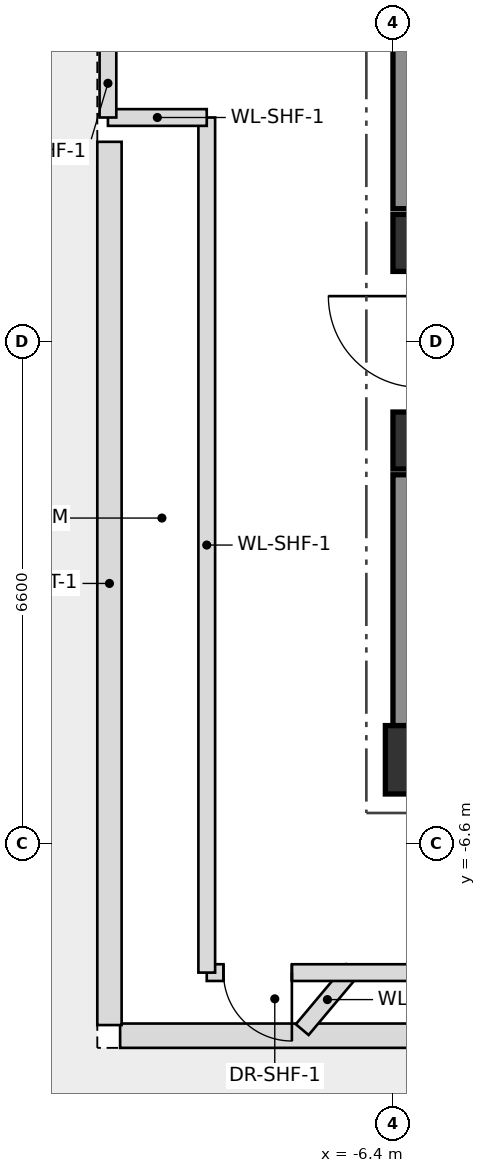
"""IFC4 building model, lengths in metres.
Left out: names, types, materials, properties, quantities, classifications, styles, units other than length and angle.
Written with IfcOpenShell. Run it as: python <this file> out.ifc"""

import sys

from ifc_helpers import new_model, si_unit, direction, frame, frame_2d, origin, origin_2d, place, context, subcontext, project, spatial, rectangle, extrude, source, transform, mapped, element, fill, save


model = new_model("IFC4")
c1 = context("Model", 3, precision=1e-05, world=origin(), true_north=direction((0.0, 1.0)))
c2 = subcontext(c1, "Body", "Model", "MODEL_VIEW")
j1 = project(units=[si_unit("LENGTHUNIT", "METRE"), si_unit("PLANEANGLEUNIT", "RADIAN")], contexts=[c1])
p1 = place(None, origin())
s1 = spatial("IfcSite", under=j1, at=p1, CompositionType="ELEMENT")
p2 = place(p1, origin())
s2 = spatial("IfcBuilding", under=s1, at=p2, CompositionType="ELEMENT")
p3 = place(p2, frame((0.0, 0.0, 49.7)))
s3 = spatial("IfcBuildingStorey", under=s2, at=p3, CompositionType="ELEMENT", Elevation=49.7)
m1 = source(origin(), c2, "Body", "SweptSolid", [
    extrude(rectangle(XDim=0.9, YDim=0.9, at=origin_2d()), origin(), (0.0, 0.0, 1.0), 5.1),
])
p4 = place(p3, frame((-6.05, -5.5, 0.0), z_axis=(0.0, 0.0, 1.0), x_axis=(1.0, 0.0, 0.0)))
e1 = element("IfcColumn", 1, at=p4, inside=s3, PredefinedType="COLUMN", context=c2, shape_type="MappedRepresentation", body=[
    mapped(m1, transform((0.0, 0.0, 0.0), scale=1.0)),
])
p5 = place(p3, frame((-6.4, -5.475, 0.0), z_axis=(0.0, 0.0, 1.0), x_axis=(1.0, 0.0, 0.0)))
e2 = element("IfcWall", 2, at=p5, inside=s3, PredefinedType="SHEAR", context=c2, shape_type="SweptSolid", body=[
    extrude(rectangle(XDim=12.8, YDim=0.75, at=frame_2d((6.4, 0.0))), origin(), (0.0, 0.0, 1.0), 5.1),
])
p6 = place(p5, frame((8.6, 0.0, 0.0)))
e3 = element("IfcOpeningElement", 3, at=p6, cuts=e2, PredefinedType="OPENING", context=c2, shape_type="SweptSolid", body=[
    extrude(rectangle(XDim=1.2, YDim=2.2, at=frame_2d((0.6, 1.1))), frame((0.0, 0.385, 0.0), z_axis=(0.0, -1.0, 0.0), x_axis=(1.0, 0.0, 0.0)), (0.0, 0.0, 1.0), 0.77),
])
for number, where, z_axis, x_axis in (
    (4, (-6.025, -5.1, 0.0), (0.0, 0.0, 1.0), (0.0, 1.0, 0.0)),
    (5, (-6.025, 1.75, 0.0), (0.0, 0.0, 1.0), (0.0, 1.0, 0.0)),
):
    element("IfcWall", number, at=place(p3, frame(where, z_axis=z_axis, x_axis=x_axis)), inside=s3, PredefinedType="SHEAR", context=c2, shape_type="SweptSolid", body=[
        extrude(rectangle(XDim=3.35, YDim=0.75, at=frame_2d((1.675, 0.0))), origin(), (0.0, 0.0, 1.0), 5.1),
    ])
m2 = source(origin(), c2, "Body", "SweptSolid", [
    extrude(rectangle(XDim=0.75, YDim=0.75, at=origin_2d()), origin(), (0.0, 0.0, 1.0), 5.1),
])
for number, where, z_axis, x_axis in (
    (6, (-6.025, -1.3, 0.0), (0.0, 0.0, 1.0), (1.0, 0.0, 0.0)),
    (7, (-6.025, 1.3, 0.0), (0.0, 0.0, 1.0), (1.0, 0.0, 0.0)),
):
    element("IfcColumn", number, at=place(p3, frame(where, z_axis=z_axis, x_axis=x_axis)), inside=s3, PredefinedType="COLUMN", context=c2, shape_type="MappedRepresentation", body=[
        mapped(m2, transform((0.0, 0.0, 0.0), scale=1.0)),
    ])
p7 = place(p3, frame((4.181, -9.13, 0.0), z_axis=(0.0, 0.0, 1.0), x_axis=(-1.0, 0.0, 0.0)))
e8 = element("IfcWall", 8, at=p7, inside=s3, PredefinedType="SOLIDWALL", context=c2, shape_type="SweptSolid", body=[
    extrude(rectangle(XDim=14.171, YDim=0.32, at=frame_2d((7.085, 0.0))), origin(), (0.0, 0.0, 1.0), 4.895),
])
p8 = place(p3, frame((-10.13, -8.99, 0.0), z_axis=(0.0, 0.0, 1.0), x_axis=(0.0, 1.0, 0.0)))
e9 = element("IfcWall", 9, at=p8, inside=s3, PredefinedType="SOLIDWALL", context=c2, shape_type="SweptSolid", body=[
    extrude(rectangle(XDim=11.62, YDim=0.32, at=frame_2d((5.81, 0.0))), origin(), (0.0, 0.0, 1.0), 3.55),
])
p9 = place(p3, frame((-6.931, -8.26, 0.0), z_axis=(0.0, 0.0, 1.0), x_axis=(-0.642881168458, -0.765965928251, 0.0)))
e10 = element("IfcWall", 10, at=p9, inside=s3, PredefinedType="PLUMBINGWALL", context=c2, shape_type="SweptSolid", body=[
    extrude(rectangle(XDim=1.031, YDim=0.22, at=frame_2d((0.516, 0.0))), origin(), (0.0, 0.0, 1.0), 4.895),
])
p10 = place(p3, frame((3.8, -8.3, 0.0), z_axis=(0.0, 0.0, 1.0), x_axis=(-1.0, 0.0, 0.0)))
e11 = element("IfcWall", 11, at=p10, inside=s3, PredefinedType="PLUMBINGWALL", context=c2, shape_type="SweptSolid", body=[
    extrude(rectangle(XDim=12.65, YDim=0.22, at=frame_2d((6.325, 0.0))), origin(), (0.0, 0.0, 1.0), 4.895),
])
p11 = place(p10, frame((11.53, 0.0, 0.0)))
e12 = element("IfcOpeningElement", 12, at=p11, cuts=e11, PredefinedType="OPENING", context=c2, shape_type="SweptSolid", body=[
    extrude(rectangle(XDim=0.9, YDim=2.05, at=frame_2d((0.45, 1.025))), frame((0.0, 0.12, 0.0), z_axis=(0.0, -1.0, 0.0), x_axis=(1.0, 0.0, 0.0)), (0.0, 0.0, 1.0), 0.24),
])
p12 = place(p3, frame((-8.85, -8.3, 0.0), z_axis=(0.0, 0.0, 1.0), x_axis=(0.0, 1.0, 0.0)))
e13 = element("IfcWall", 13, at=p12, inside=s3, PredefinedType="PLUMBINGWALL", context=c2, shape_type="SweptSolid", body=[
    extrude(rectangle(XDim=11.25, YDim=0.22, at=frame_2d((5.625, 0.0))), origin(), (0.0, 0.0, 1.0), 3.55),
])
p13 = place(p3, frame((-8.85, 2.95, 0.0), z_axis=(0.0, 0.0, 1.0), x_axis=(-1.0, 0.0, 0.0)))
e14 = element("IfcWall", 14, at=p13, inside=s3, PredefinedType="PLUMBINGWALL", context=c2, shape_type="SweptSolid", body=[
    extrude(rectangle(XDim=1.3, YDim=0.22, at=frame_2d((0.65, 0.0))), origin(), (0.0, 0.0, 1.0), 4.895),
])
p14 = place(p3, frame((-10.15, 2.95, 0.0), z_axis=(0.0, 0.0, 1.0), x_axis=(0.0, 1.0, 0.0)))
e15 = element("IfcWall", 15, at=p14, inside=s3, PredefinedType="PLUMBINGWALL", context=c2, shape_type="SweptSolid", body=[
    extrude(rectangle(XDim=3.3, YDim=0.22, at=frame_2d((1.65, 0.0))), origin(), (0.0, 0.0, 1.0), 3.55),
])
p15 = place(p14, frame((1.05, 0.0, 0.0)))
e16 = element("IfcOpeningElement", 16, at=p15, cuts=e15, PredefinedType="OPENING", context=c2, shape_type="SweptSolid", body=[
    extrude(rectangle(XDim=1.2, YDim=2.2, at=frame_2d((0.6, 1.1))), frame((0.0, 0.12, 0.0), z_axis=(0.0, -1.0, 0.0), x_axis=(1.0, 0.0, 0.0)), (0.0, 0.0, 1.0), 0.24),
])
p16 = place(p11, origin())
e17 = element("IfcDoor", 17, at=p16, inside=s3, OperationType="SINGLE_SWING_LEFT", PredefinedType="DOOR", context=c2, shape_type="SweptSolid", body=[
    extrude(rectangle(XDim=0.9, YDim=2.05, at=frame_2d((0.45, 1.025))), frame((0.0, 0.025, 0.0), z_axis=(0.0, -1.0, 0.0), x_axis=(1.0, 0.0, 0.0)), (0.0, 0.0, 1.0), 0.05),
])
fill(e12, e17)
save(model, sys.argv[1])
